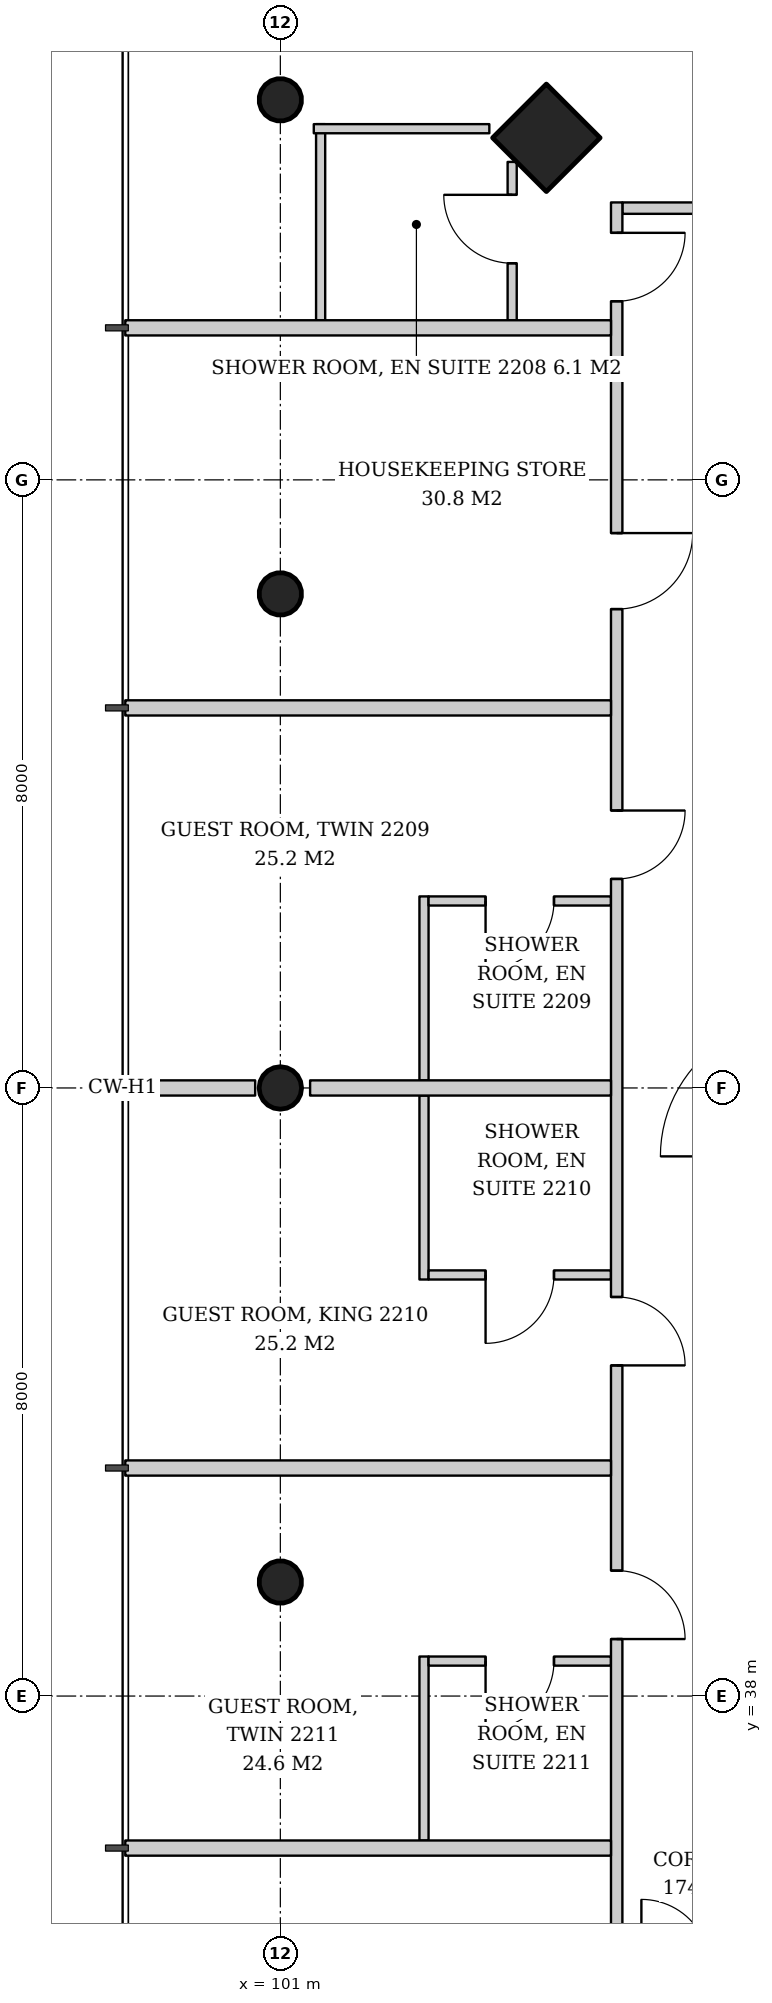
"""IFC4 building model, lengths in metres.
Left out: names, types, materials, properties, quantities, classifications, styles, units other than length and angle.
Written with IfcOpenShell. Run it as: python <this file> out.ifc"""

import sys

from ifc_helpers import new_model, si_unit, direction, frame, frame_2d, origin, origin_2d, place, context, subcontext, project, spatial, rectangle, hollow_circle, extrude, element, fill, save


model = new_model("IFC4")
c1 = context("Model", 3, precision=1e-05, world=origin(), true_north=direction((0.0, 1.0)))
c2 = subcontext(c1, "Body", "Model", "MODEL_VIEW")
j1 = project(units=[si_unit("LENGTHUNIT", "METRE"), si_unit("PLANEANGLEUNIT", "RADIAN")], contexts=[c1])
p1 = place(None, origin())
s1 = spatial("IfcSite", under=j1, at=p1, CompositionType="ELEMENT")
p2 = place(p1, origin())
s2 = spatial("IfcBuilding", under=s1, at=p2, CompositionType="ELEMENT")
p3 = place(p2, frame((0.0, 0.0, 89.4)))
s3 = spatial("IfcBuildingStorey", under=s2, at=p3, CompositionType="ELEMENT", Elevation=89.4)
p4 = place(p3, frame((104.448, 58.552, 0.0), z_axis=(0.043029647111, -0.043029647111, 0.998146732169), x_axis=(0.707106781187, 0.707106781187, 0.0)))
e1 = element("IfcColumn", 1, at=p4, inside=s3, PredefinedType="COLUMN", context=c2, shape_type="SweptSolid", body=[
    extrude(rectangle(XDim=1.0, YDim=1.0, at=origin_2d()), origin(), (0.0, 0.0, 1.0), 3.807),
])
p5 = place(p3, frame((100.948, 59.052, 0.0), z_axis=(0.043029647111, -0.043029647111, 0.998146732169), x_axis=(0.707106781187, 0.707106781187, 0.0)))
e2 = element("IfcColumn", 2, at=p5, inside=s3, PredefinedType="COLUMN", context=c2, shape_type="SweptSolid", body=[
    extrude(hollow_circle(Radius=0.28, WallThickness=0.02, at=origin_2d()), origin(), (0.0, 0.0, 1.0), 3.807),
])
p6 = place(p3, frame((100.948, 52.526, 0.0), z_axis=(0.043059525333, -0.021561848751, 0.998839808957), x_axis=(0.44774654769, 0.894160516368, 0.0)))
e3 = element("IfcColumn", 3, at=p6, inside=s3, PredefinedType="COLUMN", context=c2, shape_type="SweptSolid", body=[
    extrude(hollow_circle(Radius=0.28, WallThickness=0.02, at=origin_2d()), origin(), (0.0, 0.0, 1.0), 3.804),
])
p7 = place(p3, frame((100.948, 46.0, 0.0), z_axis=(0.043069538298, 0.0, 0.999072076915), x_axis=(0.0, 1.0, 0.0)))
e4 = element("IfcColumn", 4, at=p7, inside=s3, PredefinedType="COLUMN", context=c2, shape_type="SweptSolid", body=[
    extrude(hollow_circle(Radius=0.28, WallThickness=0.02, at=origin_2d()), origin(), (0.0, 0.0, 1.0), 3.803),
])
p8 = place(p3, frame((100.948, 39.474, 0.0), z_axis=(0.043059525333, 0.021561848751, 0.998839808957), x_axis=(-0.44774654769, 0.894160516368, 0.0)))
e5 = element("IfcColumn", 5, at=p8, inside=s3, PredefinedType="COLUMN", context=c2, shape_type="SweptSolid", body=[
    extrude(hollow_circle(Radius=0.28, WallThickness=0.02, at=origin_2d()), origin(), (0.0, 0.0, 1.0), 3.804),
])
p9 = place(p3, frame((128.65, 57.575, 0.0), z_axis=(0.0, 0.0, 1.0), x_axis=(-1.0, 0.0, 0.0)))
e6 = element("IfcWall", 6, at=p9, inside=s3, PredefinedType="PARTITIONING", context=c2, shape_type="SweptSolid", body=[
    extrude(rectangle(XDim=23.15, YDim=0.15, at=frame_2d((11.575, 0.0))), origin(), (0.0, 0.0, 1.0), 2.9),
])
p10 = place(p9, frame((0.4, 0.0, 0.0)))
e7 = element("IfcOpeningElement", 7, at=p10, cuts=e6, PredefinedType="OPENING", context=c2, shape_type="SweptSolid", body=[
    extrude(rectangle(XDim=0.9, YDim=2.1, at=frame_2d((0.45, 1.05))), frame((0.0, 0.085, 0.0), z_axis=(0.0, -1.0, 0.0), x_axis=(1.0, 0.0, 0.0)), (0.0, 0.0, 1.0), 0.17),
])
p11 = place(p9, frame((3.0, 0.0, 0.0)))
e8 = element("IfcOpeningElement", 8, at=p11, cuts=e6, PredefinedType="OPENING", context=c2, shape_type="SweptSolid", body=[
    extrude(rectangle(XDim=0.9, YDim=2.1, at=frame_2d((0.45, 1.05))), frame((0.0, 0.085, 0.0), z_axis=(0.0, -1.0, 0.0), x_axis=(1.0, 0.0, 0.0)), (0.0, 0.0, 1.0), 0.17),
])
p12 = place(p9, frame((9.4, 0.0, 0.0)))
e9 = element("IfcOpeningElement", 9, at=p12, cuts=e6, PredefinedType="OPENING", context=c2, shape_type="SweptSolid", body=[
    extrude(rectangle(XDim=0.9, YDim=2.1, at=frame_2d((0.45, 1.05))), frame((0.0, 0.085, 0.0), z_axis=(0.0, -1.0, 0.0), x_axis=(1.0, 0.0, 0.0)), (0.0, 0.0, 1.0), 0.17),
])
p13 = place(p9, frame((14.35, 0.0, 0.0)))
e10 = element("IfcOpeningElement", 10, at=p13, cuts=e6, PredefinedType="OPENING", context=c2, shape_type="SweptSolid", body=[
    extrude(rectangle(XDim=1.0, YDim=2.1, at=frame_2d((0.5, 1.05))), frame((0.0, 0.085, 0.0), z_axis=(0.0, -1.0, 0.0), x_axis=(1.0, 0.0, 0.0)), (0.0, 0.0, 1.0), 0.17),
])
p14 = place(p3, frame((104.05, 56.1, 0.0), z_axis=(0.0, 0.0, 1.0), x_axis=(0.0, 1.0, 0.0)))
e11 = element("IfcWall", 11, at=p14, inside=s3, PredefinedType="PARTITIONING", context=c2, shape_type="SweptSolid", body=[
    extrude(rectangle(XDim=2.083, YDim=0.12, at=frame_2d((1.042, 0.0))), origin(), (0.0, 0.0, 1.0), 3.6),
])
p15 = place(p14, frame((0.75, 0.0, 0.0)))
e12 = element("IfcOpeningElement", 12, at=p15, cuts=e11, PredefinedType="OPENING", context=c2, shape_type="SweptSolid", body=[
    extrude(rectangle(XDim=0.9, YDim=2.1, at=frame_2d((0.45, 1.05))), frame((0.0, 0.07, 0.0), z_axis=(0.0, -1.0, 0.0), x_axis=(1.0, 0.0, 0.0)), (0.0, 0.0, 1.0), 0.14),
])
p16 = place(p3, frame((101.53, 56.1, 0.0), z_axis=(0.0, 0.0, 1.0), x_axis=(0.0, 1.0, 0.0)))
e13 = element("IfcWall", 13, at=p16, inside=s3, PredefinedType="PARTITIONING", context=c2, shape_type="SweptSolid", body=[
    extrude(rectangle(XDim=2.58, YDim=0.12, at=frame_2d((1.29, 0.0))), origin(), (0.0, 0.0, 1.0), 3.2),
])
p17 = place(p3, frame((103.75, 58.62, 0.0), z_axis=(0.0, 0.0, 1.0), x_axis=(-1.0, 0.0, 0.0)))
e14 = element("IfcWall", 14, at=p17, inside=s3, PredefinedType="PARTITIONING", context=c2, shape_type="SweptSolid", body=[
    extrude(rectangle(XDim=2.31, YDim=0.12, at=frame_2d((1.155, 0.0))), origin(), (0.0, 0.0, 1.0), 3.2),
])
p18 = place(p3, frame((102.89, 48.52, 0.0), z_axis=(0.0, 0.0, 1.0), x_axis=(0.0, -1.0, 0.0)))
e15 = element("IfcWall", 15, at=p18, inside=s3, PredefinedType="PARTITIONING", context=c2, shape_type="SweptSolid", body=[
    extrude(rectangle(XDim=2.42, YDim=0.12, at=frame_2d((1.21, 0.0))), origin(), (0.0, 0.0, 1.0), 3.0),
])
p19 = place(p3, frame((105.35, 48.46, 0.0), z_axis=(0.0, 0.0, 1.0), x_axis=(-1.0, 0.0, 0.0)))
e16 = element("IfcWall", 16, at=p19, inside=s3, PredefinedType="PARTITIONING", context=c2, shape_type="SweptSolid", body=[
    extrude(rectangle(XDim=2.4, YDim=0.12, at=frame_2d((1.2, 0.0))), origin(), (0.0, 0.0, 1.0), 3.6),
])
p20 = place(p19, frame((0.75, 0.0, 0.0)))
e17 = element("IfcOpeningElement", 17, at=p20, cuts=e16, PredefinedType="OPENING", context=c2, shape_type="SweptSolid", body=[
    extrude(rectangle(XDim=0.9, YDim=2.1, at=frame_2d((0.45, 1.05))), frame((0.0, 0.07, 0.0), z_axis=(0.0, -1.0, 0.0), x_axis=(1.0, 0.0, 0.0)), (0.0, 0.0, 1.0), 0.14),
])
p21 = place(p3, frame((102.89, 45.9, 0.0), z_axis=(0.0, 0.0, 1.0), x_axis=(0.0, -1.0, 0.0)))
e18 = element("IfcWall", 18, at=p21, inside=s3, PredefinedType="PARTITIONING", context=c2, shape_type="SweptSolid", body=[
    extrude(rectangle(XDim=2.42, YDim=0.12, at=frame_2d((1.21, 0.0))), origin(), (0.0, 0.0, 1.0), 3.6),
])
p22 = place(p3, frame((105.35, 43.54, 0.0), z_axis=(0.0, 0.0, 1.0), x_axis=(-1.0, 0.0, 0.0)))
e19 = element("IfcWall", 19, at=p22, inside=s3, PredefinedType="PARTITIONING", context=c2, shape_type="SweptSolid", body=[
    extrude(rectangle(XDim=2.4, YDim=0.12, at=frame_2d((1.2, 0.0))), origin(), (0.0, 0.0, 1.0), 3.6),
])
p23 = place(p22, frame((0.75, 0.0, 0.0)))
e20 = element("IfcOpeningElement", 20, at=p23, cuts=e19, PredefinedType="OPENING", context=c2, shape_type="SweptSolid", body=[
    extrude(rectangle(XDim=0.9, YDim=2.1, at=frame_2d((0.45, 1.05))), frame((0.0, 0.07, 0.0), z_axis=(0.0, -1.0, 0.0), x_axis=(1.0, 0.0, 0.0)), (0.0, 0.0, 1.0), 0.14),
])
p24 = place(p3, frame((102.89, 38.52, 0.0), z_axis=(0.0, 0.0, 1.0), x_axis=(0.0, -1.0, 0.0)))
e21 = element("IfcWall", 21, at=p24, inside=s3, PredefinedType="PARTITIONING", context=c2, shape_type="SweptSolid", body=[
    extrude(rectangle(XDim=2.42, YDim=0.12, at=frame_2d((1.21, 0.0))), origin(), (0.0, 0.0, 1.0), 3.0),
])
p25 = place(p3, frame((105.35, 38.46, 0.0), z_axis=(0.0, 0.0, 1.0), x_axis=(-1.0, 0.0, 0.0)))
e22 = element("IfcWall", 22, at=p25, inside=s3, PredefinedType="PARTITIONING", context=c2, shape_type="SweptSolid", body=[
    extrude(rectangle(XDim=2.4, YDim=0.12, at=frame_2d((1.2, 0.0))), origin(), (0.0, 0.0, 1.0), 3.0),
])
p26 = place(p25, frame((0.75, 0.0, 0.0)))
e23 = element("IfcOpeningElement", 23, at=p26, cuts=e22, PredefinedType="OPENING", context=c2, shape_type="SweptSolid", body=[
    extrude(rectangle(XDim=0.9, YDim=2.1, at=frame_2d((0.45, 1.05))), frame((0.0, 0.07, 0.0), z_axis=(0.0, -1.0, 0.0), x_axis=(1.0, 0.0, 0.0)), (0.0, 0.0, 1.0), 0.14),
])
p27 = place(p3, frame((105.425, 57.65, 0.0), z_axis=(0.0, 0.0, 1.0), x_axis=(0.0, -1.0, 0.0)))
e24 = element("IfcWall", 24, at=p27, inside=s3, PredefinedType="PARTITIONING", context=c2, shape_type="SweptSolid", body=[
    extrude(rectangle(XDim=23.15, YDim=0.15, at=frame_2d((11.575, 0.0))), origin(), (0.0, 0.0, 1.0), 2.9),
])
p28 = place(p27, frame((0.4, 0.0, 0.0)))
e25 = element("IfcOpeningElement", 25, at=p28, cuts=e24, PredefinedType="OPENING", context=c2, shape_type="SweptSolid", body=[
    extrude(rectangle(XDim=0.9, YDim=2.1, at=frame_2d((0.45, 1.05))), frame((0.0, 0.085, 0.0), z_axis=(0.0, -1.0, 0.0), x_axis=(1.0, 0.0, 0.0)), (0.0, 0.0, 1.0), 0.17),
])
p29 = place(p27, frame((4.35, 0.0, 0.0)))
e26 = element("IfcOpeningElement", 26, at=p29, cuts=e24, PredefinedType="OPENING", context=c2, shape_type="SweptSolid", body=[
    extrude(rectangle(XDim=1.0, YDim=2.1, at=frame_2d((0.5, 1.05))), frame((0.0, 0.085, 0.0), z_axis=(0.0, -1.0, 0.0), x_axis=(1.0, 0.0, 0.0)), (0.0, 0.0, 1.0), 0.17),
])
p30 = place(p27, frame((8.0, 0.0, 0.0)))
e27 = element("IfcOpeningElement", 27, at=p30, cuts=e24, PredefinedType="OPENING", context=c2, shape_type="SweptSolid", body=[
    extrude(rectangle(XDim=0.9, YDim=2.1, at=frame_2d((0.45, 1.05))), frame((0.0, 0.085, 0.0), z_axis=(0.0, -1.0, 0.0), x_axis=(1.0, 0.0, 0.0)), (0.0, 0.0, 1.0), 0.17),
])
p31 = place(p27, frame((14.4, 0.0, 0.0)))
e28 = element("IfcOpeningElement", 28, at=p31, cuts=e24, PredefinedType="OPENING", context=c2, shape_type="SweptSolid", body=[
    extrude(rectangle(XDim=0.9, YDim=2.1, at=frame_2d((0.45, 1.05))), frame((0.0, 0.085, 0.0), z_axis=(0.0, -1.0, 0.0), x_axis=(1.0, 0.0, 0.0)), (0.0, 0.0, 1.0), 0.17),
])
p32 = place(p27, frame((18.0, 0.0, 0.0)))
e29 = element("IfcOpeningElement", 29, at=p32, cuts=e24, PredefinedType="OPENING", context=c2, shape_type="SweptSolid", body=[
    extrude(rectangle(XDim=0.9, YDim=2.1, at=frame_2d((0.45, 1.05))), frame((0.0, 0.085, 0.0), z_axis=(0.0, -1.0, 0.0), x_axis=(1.0, 0.0, 0.0)), (0.0, 0.0, 1.0), 0.17),
])
p33 = place(p3, frame((105.35, 56.0, 0.0), z_axis=(0.0, 0.0, 1.0), x_axis=(-1.0, 0.0, 0.0)))
e30 = element("IfcWall", 30, at=p33, inside=s3, PredefinedType="PARTITIONING", context=c2, shape_type="SweptSolid", body=[
    extrude(rectangle(XDim=6.39, YDim=0.2, at=frame_2d((3.195, 0.0))), origin(), (0.0, 0.0, 1.0), 3.2),
])
p34 = place(p3, frame((105.35, 51.0, 0.0), z_axis=(0.0, 0.0, 1.0), x_axis=(-1.0, 0.0, 0.0)))
e31 = element("IfcWall", 31, at=p34, inside=s3, PredefinedType="PARTITIONING", context=c2, shape_type="SweptSolid", body=[
    extrude(rectangle(XDim=6.39, YDim=0.2, at=frame_2d((3.195, 0.0))), origin(), (0.0, 0.0, 1.0), 3.0),
])
p35 = place(p3, frame((105.35, 46.0, 0.0), z_axis=(0.0, 0.0, 1.0), x_axis=(-1.0, 0.0, 0.0)))
e32 = element("IfcWall", 32, at=p35, inside=s3, PredefinedType="PARTITIONING", context=c2, shape_type="SweptSolid", body=[
    extrude(rectangle(XDim=3.958, YDim=0.2, at=frame_2d((1.979, 0.0))), origin(), (0.0, 0.0, 1.0), 3.6),
])
p36 = place(p3, frame((100.669, 46.0, 0.0), z_axis=(0.0, 0.0, 1.0), x_axis=(-1.0, 0.0, 0.0)))
e33 = element("IfcWall", 33, at=p36, inside=s3, PredefinedType="PARTITIONING", context=c2, shape_type="SweptSolid", body=[
    extrude(rectangle(XDim=1.709, YDim=0.2, at=frame_2d((0.854, 0.0))), origin(), (0.0, 0.0, 1.0), 3.6),
])
for number, where, z_axis, x_axis in (
    (34, (105.35, 41.0, 0.0), (0.0, 0.0, 1.0), (-1.0, 0.0, 0.0)),
    (35, (105.35, 36.0, 0.0), (0.0, 0.0, 1.0), (-1.0, 0.0, 0.0)),
):
    element("IfcWall", number, at=place(p3, frame(where, z_axis=z_axis, x_axis=x_axis)), inside=s3, PredefinedType="PARTITIONING", context=c2, shape_type="SweptSolid", body=[
        extrude(rectangle(XDim=6.39, YDim=0.2, at=frame_2d((3.195, 0.0))), origin(), (0.0, 0.0, 1.0), 3.2),
    ])
p37 = place(p15, origin())
e36 = element("IfcDoor", 36, at=p37, inside=s3, OperationType="SINGLE_SWING_RIGHT", PredefinedType="DOOR", context=c2, shape_type="SweptSolid", body=[
    extrude(rectangle(XDim=0.9, YDim=2.1, at=frame_2d((0.45, 1.05))), frame((0.0, 0.025, 0.0), z_axis=(0.0, -1.0, 0.0), x_axis=(1.0, 0.0, 0.0)), (0.0, 0.0, 1.0), 0.05),
])
fill(e12, e36)
p38 = place(p20, origin())
e37 = element("IfcDoor", 37, at=p38, inside=s3, OperationType="SINGLE_SWING_RIGHT", PredefinedType="DOOR", context=c2, shape_type="SweptSolid", body=[
    extrude(rectangle(XDim=0.9, YDim=2.1, at=frame_2d((0.45, 1.05))), frame((0.0, 0.025, 0.0), z_axis=(0.0, -1.0, 0.0), x_axis=(1.0, 0.0, 0.0)), (0.0, 0.0, 1.0), 0.05),
])
fill(e17, e37)
p39 = place(p23, origin())
e38 = element("IfcDoor", 38, at=p39, inside=s3, OperationType="SINGLE_SWING_RIGHT", PredefinedType="DOOR", context=c2, shape_type="SweptSolid", body=[
    extrude(rectangle(XDim=0.9, YDim=2.1, at=frame_2d((0.45, 1.05))), frame((0.0, 0.025, 0.0), z_axis=(0.0, -1.0, 0.0), x_axis=(1.0, 0.0, 0.0)), (0.0, 0.0, 1.0), 0.05),
])
fill(e20, e38)
p40 = place(p26, origin())
e39 = element("IfcDoor", 39, at=p40, inside=s3, OperationType="SINGLE_SWING_RIGHT", PredefinedType="DOOR", context=c2, shape_type="SweptSolid", body=[
    extrude(rectangle(XDim=0.9, YDim=2.1, at=frame_2d((0.45, 1.05))), frame((0.0, 0.025, 0.0), z_axis=(0.0, -1.0, 0.0), x_axis=(1.0, 0.0, 0.0)), (0.0, 0.0, 1.0), 0.05),
])
fill(e23, e39)
p41 = place(p28, origin())
e40 = element("IfcDoor", 40, at=p41, inside=s3, OperationType="SINGLE_SWING_LEFT", PredefinedType="DOOR", context=c2, shape_type="SweptSolid", body=[
    extrude(rectangle(XDim=0.9, YDim=2.1, at=frame_2d((0.45, 1.05))), frame((0.0, 0.025, 0.0), z_axis=(0.0, -1.0, 0.0), x_axis=(1.0, 0.0, 0.0)), (0.0, 0.0, 1.0), 0.05),
])
fill(e25, e40)
p42 = place(p29, origin())
e41 = element("IfcDoor", 41, at=p42, inside=s3, OperationType="SINGLE_SWING_LEFT", PredefinedType="DOOR", context=c2, shape_type="SweptSolid", body=[
    extrude(rectangle(XDim=1.0, YDim=2.1, at=frame_2d((0.5, 1.05))), frame((0.0, 0.025, 0.0), z_axis=(0.0, -1.0, 0.0), x_axis=(1.0, 0.0, 0.0)), (0.0, 0.0, 1.0), 0.05),
])
fill(e26, e41)
p43 = place(p30, origin())
e42 = element("IfcDoor", 42, at=p43, inside=s3, OperationType="SINGLE_SWING_LEFT", PredefinedType="DOOR", context=c2, shape_type="SweptSolid", body=[
    extrude(rectangle(XDim=0.9, YDim=2.1, at=frame_2d((0.45, 1.05))), frame((0.0, 0.025, 0.0), z_axis=(0.0, -1.0, 0.0), x_axis=(1.0, 0.0, 0.0)), (0.0, 0.0, 1.0), 0.05),
])
fill(e27, e42)
p44 = place(p31, origin())
e43 = element("IfcDoor", 43, at=p44, inside=s3, OperationType="SINGLE_SWING_RIGHT", PredefinedType="DOOR", context=c2, shape_type="SweptSolid", body=[
    extrude(rectangle(XDim=0.9, YDim=2.1, at=frame_2d((0.45, 1.05))), frame((0.0, 0.025, 0.0), z_axis=(0.0, -1.0, 0.0), x_axis=(1.0, 0.0, 0.0)), (0.0, 0.0, 1.0), 0.05),
])
fill(e28, e43)
p45 = place(p32, origin())
e44 = element("IfcDoor", 44, at=p45, inside=s3, OperationType="SINGLE_SWING_RIGHT", PredefinedType="DOOR", context=c2, shape_type="SweptSolid", body=[
    extrude(rectangle(XDim=0.9, YDim=2.1, at=frame_2d((0.45, 1.05))), frame((0.0, 0.025, 0.0), z_axis=(0.0, -1.0, 0.0), x_axis=(1.0, 0.0, 0.0)), (0.0, 0.0, 1.0), 0.05),
])
fill(e29, e44)
save(model, sys.argv[1])
